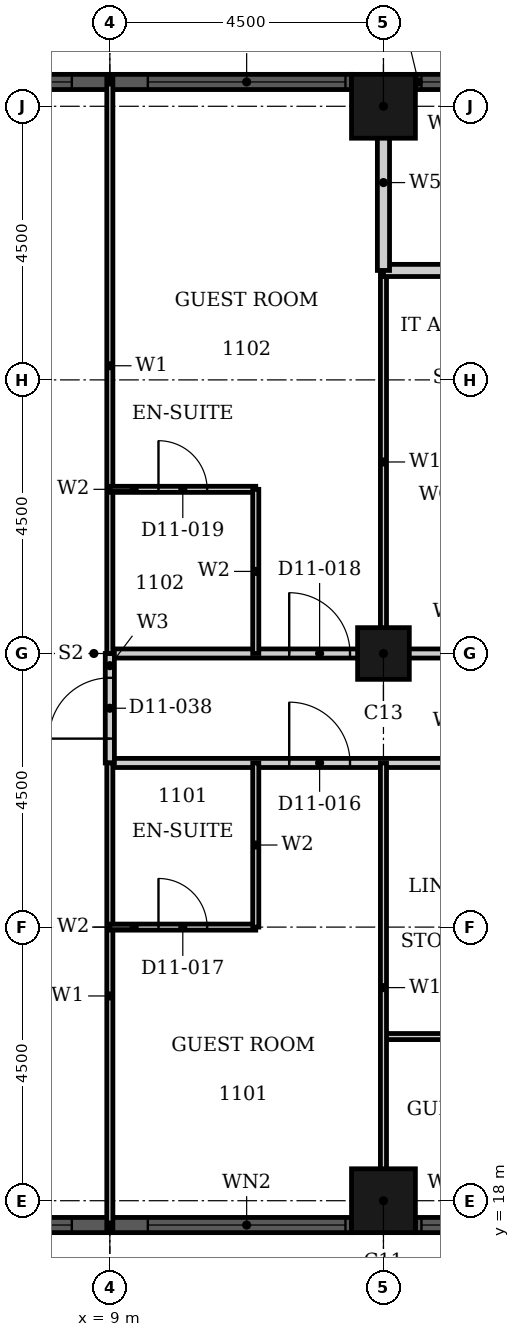
"""IFC4 building model, lengths in metres.
Left out: names, types, materials, properties, quantities, classifications, styles, units other than length and angle.
Written with IfcOpenShell. Run it as: python <this file> out.ifc"""

import sys

from ifc_helpers import new_model, si_unit, direction, frame, frame_2d, origin, origin_2d, place, context, subcontext, project, spatial, rectangle, hollow_rectangle, extrude, element, fill, save


model = new_model("IFC4")
c1 = context("Model", 3, precision=1e-05, world=origin(), true_north=direction((0.0, 1.0)))
c2 = subcontext(c1, "Body", "Model", "MODEL_VIEW")
j1 = project(units=[si_unit("LENGTHUNIT", "METRE"), si_unit("PLANEANGLEUNIT", "RADIAN")], contexts=[c1])
p1 = place(None, origin())
s1 = spatial("IfcSite", under=j1, at=p1, CompositionType="ELEMENT")
p2 = place(p1, origin())
s2 = spatial("IfcBuilding", under=s1, at=p2, CompositionType="ELEMENT")
p3 = place(p2, frame((0.0, 0.0, 52.8)))
s3 = spatial("IfcBuildingStorey", under=s2, at=p3, CompositionType="ELEMENT", Elevation=52.8)
for number, where, z_axis, x_axis in (
    (1, (13.5, 36.0, 0.0), (0.0, 0.0, 1.0), (1.0, 0.0, 0.0)),
    (2, (13.5, 18.0, 0.0), (0.0, 0.0, 1.0), (1.0, 0.0, 0.0)),
):
    element("IfcColumn", number, at=place(p3, frame(where, z_axis=z_axis, x_axis=x_axis)), inside=s3, PredefinedType="COLUMN", context=c2, shape_type="SweptSolid", body=[
        extrude(hollow_rectangle(XDim=1.05, YDim=1.05, WallThickness=0.034, at=origin_2d()), origin(), (0.0, 0.0, 1.0), 3.6),
    ])
p4 = place(p3, frame((13.5, 27.0, 0.0), z_axis=(0.0, 0.0, 1.0), x_axis=(1.0, 0.0, 0.0)))
e3 = element("IfcColumn", 3, at=p4, inside=s3, PredefinedType="COLUMN", context=c2, shape_type="SweptSolid", body=[
    extrude(hollow_rectangle(XDim=0.85, YDim=0.85, WallThickness=0.026, at=origin_2d()), origin(), (0.0, 0.0, 1.0), 3.6),
])
p5 = place(p3, frame((15.225, 36.4, 0.0), z_axis=(0.0, 0.0, 1.0), x_axis=(-1.0, 0.0, 0.0)))
e4 = element("IfcWall", 4, at=p5, inside=s3, PredefinedType="SOLIDWALL", context=c2, shape_type="SweptSolid", body=[
    extrude(rectangle(XDim=1.2, YDim=0.25, at=frame_2d((0.6, 0.0))), origin(), (0.0, 0.0, 1.0), 3.6),
])
p6 = place(p5, frame((0.1, 0.0, 0.9)))
e5 = element("IfcOpeningElement", 5, at=p6, cuts=e4, PredefinedType="OPENING", context=c2, shape_type="SweptSolid", body=[
    extrude(rectangle(XDim=1.0, YDim=2.08, at=frame_2d((0.5, 1.04))), frame((0.0, 0.135, 0.0), z_axis=(0.0, -1.0, 0.0), x_axis=(1.0, 0.0, 0.0)), (0.0, 0.0, 1.0), 0.27),
])
p7 = place(p3, frame((12.975, 36.4, 0.0), z_axis=(0.0, 0.0, 1.0), x_axis=(-1.0, 0.0, 0.0)))
e6 = element("IfcWall", 6, at=p7, inside=s3, PredefinedType="SOLIDWALL", context=c2, shape_type="SweptSolid", body=[
    extrude(rectangle(XDim=7.95, YDim=0.25, at=frame_2d((3.975, 0.0))), origin(), (0.0, 0.0, 1.0), 3.6),
])
p8 = place(p7, frame((0.1, 0.0, 0.9)))
e7 = element("IfcOpeningElement", 7, at=p8, cuts=e6, PredefinedType="OPENING", context=c2, shape_type="SweptSolid", body=[
    extrude(rectangle(XDim=3.25, YDim=2.08, at=frame_2d((1.625, 1.04))), frame((0.0, 0.135, 0.0), z_axis=(0.0, -1.0, 0.0), x_axis=(1.0, 0.0, 0.0)), (0.0, 0.0, 1.0), 0.27),
])
p9 = place(p7, frame((4.6, 0.0, 0.9)))
e8 = element("IfcOpeningElement", 8, at=p9, cuts=e6, PredefinedType="OPENING", context=c2, shape_type="SweptSolid", body=[
    extrude(rectangle(XDim=3.25, YDim=2.08, at=frame_2d((1.625, 1.04))), frame((0.0, 0.135, 0.0), z_axis=(0.0, -1.0, 0.0), x_axis=(1.0, 0.0, 0.0)), (0.0, 0.0, 1.0), 0.27),
])
p10 = place(p3, frame((5.025, 17.6, 0.0), z_axis=(0.0, 0.0, 1.0), x_axis=(1.0, 0.0, 0.0)))
e9 = element("IfcWall", 9, at=p10, inside=s3, PredefinedType="SOLIDWALL", context=c2, shape_type="SweptSolid", body=[
    extrude(rectangle(XDim=7.95, YDim=0.25, at=frame_2d((3.975, 0.0))), origin(), (0.0, 0.0, 1.0), 3.6),
])
p11 = place(p10, frame((0.1, 0.0, 0.9)))
e10 = element("IfcOpeningElement", 10, at=p11, cuts=e9, PredefinedType="OPENING", context=c2, shape_type="SweptSolid", body=[
    extrude(rectangle(XDim=3.25, YDim=2.08, at=frame_2d((1.625, 1.04))), frame((0.0, 0.135, 0.0), z_axis=(0.0, -1.0, 0.0), x_axis=(1.0, 0.0, 0.0)), (0.0, 0.0, 1.0), 0.27),
])
p12 = place(p10, frame((4.6, 0.0, 0.9)))
e11 = element("IfcOpeningElement", 11, at=p12, cuts=e9, PredefinedType="OPENING", context=c2, shape_type="SweptSolid", body=[
    extrude(rectangle(XDim=3.25, YDim=2.08, at=frame_2d((1.625, 1.04))), frame((0.0, 0.135, 0.0), z_axis=(0.0, -1.0, 0.0), x_axis=(1.0, 0.0, 0.0)), (0.0, 0.0, 1.0), 0.27),
])
p13 = place(p3, frame((14.025, 17.6, 0.0), z_axis=(0.0, 0.0, 1.0), x_axis=(1.0, 0.0, 0.0)))
e12 = element("IfcWall", 12, at=p13, inside=s3, PredefinedType="SOLIDWALL", context=c2, shape_type="SweptSolid", body=[
    extrude(rectangle(XDim=1.2, YDim=0.25, at=frame_2d((0.6, 0.0))), origin(), (0.0, 0.0, 1.0), 3.6),
])
p14 = place(p13, frame((0.1, 0.0, 0.9)))
e13 = element("IfcOpeningElement", 13, at=p14, cuts=e12, PredefinedType="OPENING", context=c2, shape_type="SweptSolid", body=[
    extrude(rectangle(XDim=1.0, YDim=2.08, at=frame_2d((0.5, 1.04))), frame((0.0, 0.135, 0.0), z_axis=(0.0, -1.0, 0.0), x_axis=(1.0, 0.0, 0.0)), (0.0, 0.0, 1.0), 0.27),
])
p15 = place(p3, frame((9.0, 25.2, 0.0), z_axis=(0.0, 0.0, 1.0), x_axis=(1.0, 0.0, 0.0)))
e14 = element("IfcWall", 14, at=p15, inside=s3, PredefinedType="PARTITIONING", context=c2, shape_type="SweptSolid", body=[
    extrude(rectangle(XDim=7.2, YDim=0.15, at=frame_2d((3.6, 0.0))), origin(), (0.0, 0.0, 1.0), 3.3),
])
p16 = place(p15, frame((2.95, 0.0, 0.0)))
e15 = element("IfcOpeningElement", 15, at=p16, cuts=e14, PredefinedType="OPENING", context=c2, shape_type="SweptSolid", body=[
    extrude(rectangle(XDim=1.0, YDim=2.1, at=frame_2d((0.5, 1.05))), frame((0.0, 0.085, 0.0), z_axis=(0.0, -1.0, 0.0), x_axis=(1.0, 0.0, 0.0)), (0.0, 0.0, 1.0), 0.17),
])
p17 = place(p3, frame((9.0, 27.0, 0.0), z_axis=(0.0, 0.0, 1.0), x_axis=(1.0, 0.0, 0.0)))
e16 = element("IfcWall", 16, at=p17, inside=s3, PredefinedType="PARTITIONING", context=c2, shape_type="SweptSolid", body=[
    extrude(rectangle(XDim=7.2, YDim=0.15, at=frame_2d((3.6, 0.0))), origin(), (0.0, 0.0, 1.0), 2.58),
])
p18 = place(p17, frame((2.95, 0.0, 0.0)))
e17 = element("IfcOpeningElement", 17, at=p18, cuts=e16, PredefinedType="OPENING", context=c2, shape_type="SweptSolid", body=[
    extrude(rectangle(XDim=1.0, YDim=2.1, at=frame_2d((0.5, 1.05))), frame((0.0, 0.085, 0.0), z_axis=(0.0, -1.0, 0.0), x_axis=(1.0, 0.0, 0.0)), (0.0, 0.0, 1.0), 0.17),
])
p19 = place(p3, frame((9.0, 25.2, 0.0), z_axis=(0.0, 0.0, 1.0), x_axis=(0.0, 1.0, 0.0)))
e18 = element("IfcWall", 18, at=p19, inside=s3, PredefinedType="PARTITIONING", context=c2, shape_type="SweptSolid", body=[
    extrude(rectangle(XDim=1.8, YDim=0.15, at=frame_2d((0.9, 0.0))), origin(), (0.0, 0.0, 1.0), 3.3),
])
p20 = place(p19, frame((0.4, 0.0, 0.0)))
e19 = element("IfcOpeningElement", 19, at=p20, cuts=e18, PredefinedType="OPENING", context=c2, shape_type="SweptSolid", body=[
    extrude(rectangle(XDim=1.0, YDim=2.1, at=frame_2d((0.5, 1.05))), frame((0.0, 0.085, 0.0), z_axis=(0.0, -1.0, 0.0), x_axis=(1.0, 0.0, 0.0)), (0.0, 0.0, 1.0), 0.17),
])
p21 = place(p3, frame((13.5, 20.7, 0.0), z_axis=(0.0, 0.0, 1.0), x_axis=(1.0, 0.0, 0.0)))
e20 = element("IfcWall", 20, at=p21, inside=s3, PredefinedType="PARTITIONING", context=c2, shape_type="SweptSolid", body=[
    extrude(rectangle(XDim=2.7, YDim=0.1, at=frame_2d((1.35, 0.0))), origin(), (0.0, 0.0, 1.0), 3.3),
])
p22 = place(p3, frame((13.5, 27.0, 0.0), z_axis=(0.0, 0.0, 1.0), x_axis=(0.0, 1.0, 0.0)))
e21 = element("IfcWall", 21, at=p22, inside=s3, PredefinedType="PARTITIONING", context=c2, shape_type="SweptSolid", body=[
    extrude(rectangle(XDim=6.3, YDim=0.1, at=frame_2d((3.15, 0.0))), origin(), (0.0, 0.0, 1.0), 2.38),
])
p23 = place(p3, frame((13.5, 17.81, 0.0), z_axis=(0.0, 0.0, 1.0), x_axis=(0.0, 1.0, 0.0)))
e22 = element("IfcWall", 22, at=p23, inside=s3, PredefinedType="PARTITIONING", context=c2, shape_type="SweptSolid", body=[
    extrude(rectangle(XDim=7.39, YDim=0.1, at=frame_2d((3.695, 0.0))), origin(), (0.0, 0.0, 1.0), 2.38),
])
p24 = place(p3, frame((9.0, 27.0, 0.0), z_axis=(0.0, 0.0, 1.0), x_axis=(0.0, 1.0, 0.0)))
e23 = element("IfcWall", 23, at=p24, inside=s3, PredefinedType="PARTITIONING", context=c2, shape_type="SweptSolid", body=[
    extrude(rectangle(XDim=9.465, YDim=0.1, at=frame_2d((4.732, 0.0))), origin(), (0.0, 0.0, 1.0), 3.3),
])
p25 = place(p3, frame((9.0, 17.535, 0.0), z_axis=(0.0, 0.0, 1.0), x_axis=(0.0, 1.0, 0.0)))
e24 = element("IfcWall", 24, at=p25, inside=s3, PredefinedType="PARTITIONING", context=c2, shape_type="SweptSolid", body=[
    extrude(rectangle(XDim=7.665, YDim=0.1, at=frame_2d((3.833, 0.0))), origin(), (0.0, 0.0, 1.0), 3.3),
])
p26 = place(p3, frame((9.0, 22.5, 0.0), z_axis=(0.0, 0.0, 1.0), x_axis=(1.0, 0.0, 0.0)))
e25 = element("IfcWall", 25, at=p26, inside=s3, PredefinedType="PARTITIONING", context=c2, shape_type="SweptSolid", body=[
    extrude(rectangle(XDim=2.4, YDim=0.1, at=frame_2d((1.2, 0.0))), origin(), (0.0, 0.0, 1.0), 2.58),
])
p27 = place(p26, frame((0.8, 0.0, 0.0)))
e26 = element("IfcOpeningElement", 26, at=p27, cuts=e25, PredefinedType="OPENING", context=c2, shape_type="SweptSolid", body=[
    extrude(rectangle(XDim=0.8, YDim=2.1, at=frame_2d((0.4, 1.05))), frame((0.0, 0.06, 0.0), z_axis=(0.0, -1.0, 0.0), x_axis=(1.0, 0.0, 0.0)), (0.0, 0.0, 1.0), 0.12),
])
p28 = place(p3, frame((9.0, 29.7, 0.0), z_axis=(0.0, 0.0, 1.0), x_axis=(1.0, 0.0, 0.0)))
e27 = element("IfcWall", 27, at=p28, inside=s3, PredefinedType="PARTITIONING", context=c2, shape_type="SweptSolid", body=[
    extrude(rectangle(XDim=2.4, YDim=0.1, at=frame_2d((1.2, 0.0))), origin(), (0.0, 0.0, 1.0), 3.3),
])
p29 = place(p28, frame((0.8, 0.0, 0.0)))
e28 = element("IfcOpeningElement", 28, at=p29, cuts=e27, PredefinedType="OPENING", context=c2, shape_type="SweptSolid", body=[
    extrude(rectangle(XDim=0.8, YDim=2.1, at=frame_2d((0.4, 1.05))), frame((0.0, 0.06, 0.0), z_axis=(0.0, -1.0, 0.0), x_axis=(1.0, 0.0, 0.0)), (0.0, 0.0, 1.0), 0.12),
])
for number, where, z_axis, x_axis in (
    (29, (11.4, 27.0, 0.0), (0.0, 0.0, 1.0), (0.0, 1.0, 0.0)),
    (30, (11.4, 22.5, 0.0), (0.0, 0.0, 1.0), (0.0, 1.0, 0.0)),
):
    element("IfcWall", number, at=place(p3, frame(where, z_axis=z_axis, x_axis=x_axis)), inside=s3, PredefinedType="PARTITIONING", context=c2, shape_type="SweptSolid", body=[
        extrude(rectangle(XDim=2.7, YDim=0.1, at=frame_2d((1.35, 0.0))), origin(), (0.0, 0.0, 1.0), 3.3),
    ])
p30 = place(p3, frame((13.5, 33.3, 0.0), z_axis=(0.0, 0.0, 1.0), x_axis=(1.0, 0.0, 0.0)))
e31 = element("IfcWall", 31, at=p30, inside=s3, PredefinedType="PARTITIONING", context=c2, shape_type="SweptSolid", body=[
    extrude(rectangle(XDim=4.5, YDim=0.2, at=frame_2d((2.25, 0.0))), origin(), (0.0, 0.0, 1.0), 3.3),
])
p31 = place(p30, frame((3.15, 0.0, 0.0)))
e32 = element("IfcOpeningElement", 32, at=p31, cuts=e31, PredefinedType="OPENING", context=c2, shape_type="SweptSolid", body=[
    extrude(rectangle(XDim=0.9, YDim=2.1, at=frame_2d((0.45, 1.05))), frame((0.0, 0.11, 0.0), z_axis=(0.0, -1.0, 0.0), x_axis=(1.0, 0.0, 0.0)), (0.0, 0.0, 1.0), 0.22),
])
p32 = place(p3, frame((13.5, 33.3, 0.0), z_axis=(0.0, 0.0, 1.0), x_axis=(0.0, 1.0, 0.0)))
e33 = element("IfcWall", 33, at=p32, inside=s3, PredefinedType="PARTITIONING", context=c2, shape_type="SweptSolid", body=[
    extrude(rectangle(XDim=2.89, YDim=0.2, at=frame_2d((1.445, 0.0))), origin(), (0.0, 0.0, 1.0), 2.38),
])
p33 = place(p6, origin())
e34 = element("IfcWindow", 34, at=p33, inside=s3, PartitioningType="SINGLE_PANEL", PredefinedType="WINDOW", context=c2, shape_type="SweptSolid", body=[
    extrude(rectangle(XDim=1.0, YDim=2.08, at=frame_2d((0.5, 1.04))), frame((0.0, 0.03, 0.0), z_axis=(0.0, -1.0, 0.0), x_axis=(1.0, 0.0, 0.0)), (0.0, 0.0, 1.0), 0.06),
])
fill(e5, e34)
p34 = place(p8, origin())
e35 = element("IfcWindow", 35, at=p34, inside=s3, PartitioningType="SINGLE_PANEL", PredefinedType="WINDOW", context=c2, shape_type="SweptSolid", body=[
    extrude(rectangle(XDim=3.25, YDim=2.08, at=frame_2d((1.625, 1.04))), frame((0.0, 0.03, 0.0), z_axis=(0.0, -1.0, 0.0), x_axis=(1.0, 0.0, 0.0)), (0.0, 0.0, 1.0), 0.06),
])
fill(e7, e35)
p35 = place(p9, origin())
e36 = element("IfcWindow", 36, at=p35, inside=s3, PartitioningType="SINGLE_PANEL", PredefinedType="WINDOW", context=c2, shape_type="SweptSolid", body=[
    extrude(rectangle(XDim=3.25, YDim=2.08, at=frame_2d((1.625, 1.04))), frame((0.0, 0.03, 0.0), z_axis=(0.0, -1.0, 0.0), x_axis=(1.0, 0.0, 0.0)), (0.0, 0.0, 1.0), 0.06),
])
fill(e8, e36)
p36 = place(p11, origin())
e37 = element("IfcWindow", 37, at=p36, inside=s3, PartitioningType="SINGLE_PANEL", PredefinedType="WINDOW", context=c2, shape_type="SweptSolid", body=[
    extrude(rectangle(XDim=3.25, YDim=2.08, at=frame_2d((1.625, 1.04))), frame((0.0, 0.03, 0.0), z_axis=(0.0, -1.0, 0.0), x_axis=(1.0, 0.0, 0.0)), (0.0, 0.0, 1.0), 0.06),
])
fill(e10, e37)
p37 = place(p12, origin())
e38 = element("IfcWindow", 38, at=p37, inside=s3, PartitioningType="SINGLE_PANEL", PredefinedType="WINDOW", context=c2, shape_type="SweptSolid", body=[
    extrude(rectangle(XDim=3.25, YDim=2.08, at=frame_2d((1.625, 1.04))), frame((0.0, 0.03, 0.0), z_axis=(0.0, -1.0, 0.0), x_axis=(1.0, 0.0, 0.0)), (0.0, 0.0, 1.0), 0.06),
])
fill(e11, e38)
p38 = place(p14, origin())
e39 = element("IfcWindow", 39, at=p38, inside=s3, PartitioningType="SINGLE_PANEL", PredefinedType="WINDOW", context=c2, shape_type="SweptSolid", body=[
    extrude(rectangle(XDim=1.0, YDim=2.08, at=frame_2d((0.5, 1.04))), frame((0.0, 0.03, 0.0), z_axis=(0.0, -1.0, 0.0), x_axis=(1.0, 0.0, 0.0)), (0.0, 0.0, 1.0), 0.06),
])
fill(e13, e39)
p39 = place(p16, origin())
e40 = element("IfcDoor", 40, at=p39, inside=s3, OperationType="SINGLE_SWING_RIGHT", PredefinedType="DOOR", context=c2, shape_type="SweptSolid", body=[
    extrude(rectangle(XDim=1.0, YDim=2.1, at=frame_2d((0.5, 1.05))), frame((0.0, 0.025, 0.0), z_axis=(0.0, -1.0, 0.0), x_axis=(1.0, 0.0, 0.0)), (0.0, 0.0, 1.0), 0.05),
])
fill(e15, e40)
p40 = place(p27, origin())
e41 = element("IfcDoor", 41, at=p40, inside=s3, OperationType="SINGLE_SWING_LEFT", PredefinedType="DOOR", context=c2, shape_type="SweptSolid", body=[
    extrude(rectangle(XDim=0.8, YDim=2.1, at=frame_2d((0.4, 1.05))), frame((0.0, 0.025, 0.0), z_axis=(0.0, -1.0, 0.0), x_axis=(1.0, 0.0, 0.0)), (0.0, 0.0, 1.0), 0.05),
])
fill(e26, e41)
p41 = place(p18, origin())
e42 = element("IfcDoor", 42, at=p41, inside=s3, OperationType="SINGLE_SWING_RIGHT", PredefinedType="DOOR", context=c2, shape_type="SweptSolid", body=[
    extrude(rectangle(XDim=1.0, YDim=2.1, at=frame_2d((0.5, 1.05))), frame((0.0, 0.025, 0.0), z_axis=(0.0, -1.0, 0.0), x_axis=(1.0, 0.0, 0.0)), (0.0, 0.0, 1.0), 0.05),
])
fill(e17, e42)
p42 = place(p29, origin())
e43 = element("IfcDoor", 43, at=p42, inside=s3, OperationType="SINGLE_SWING_RIGHT", PredefinedType="DOOR", context=c2, shape_type="SweptSolid", body=[
    extrude(rectangle(XDim=0.8, YDim=2.1, at=frame_2d((0.4, 1.05))), frame((0.0, 0.025, 0.0), z_axis=(0.0, -1.0, 0.0), x_axis=(1.0, 0.0, 0.0)), (0.0, 0.0, 1.0), 0.05),
])
fill(e28, e43)
p43 = place(p20, origin())
e44 = element("IfcDoor", 44, at=p43, inside=s3, OperationType="SINGLE_SWING_RIGHT", PredefinedType="DOOR", context=c2, shape_type="SweptSolid", body=[
    extrude(rectangle(XDim=1.0, YDim=2.1, at=frame_2d((0.5, 1.05))), frame((0.0, 0.025, 0.0), z_axis=(0.0, -1.0, 0.0), x_axis=(1.0, 0.0, 0.0)), (0.0, 0.0, 1.0), 0.05),
])
fill(e19, e44)
save(model, sys.argv[1])
